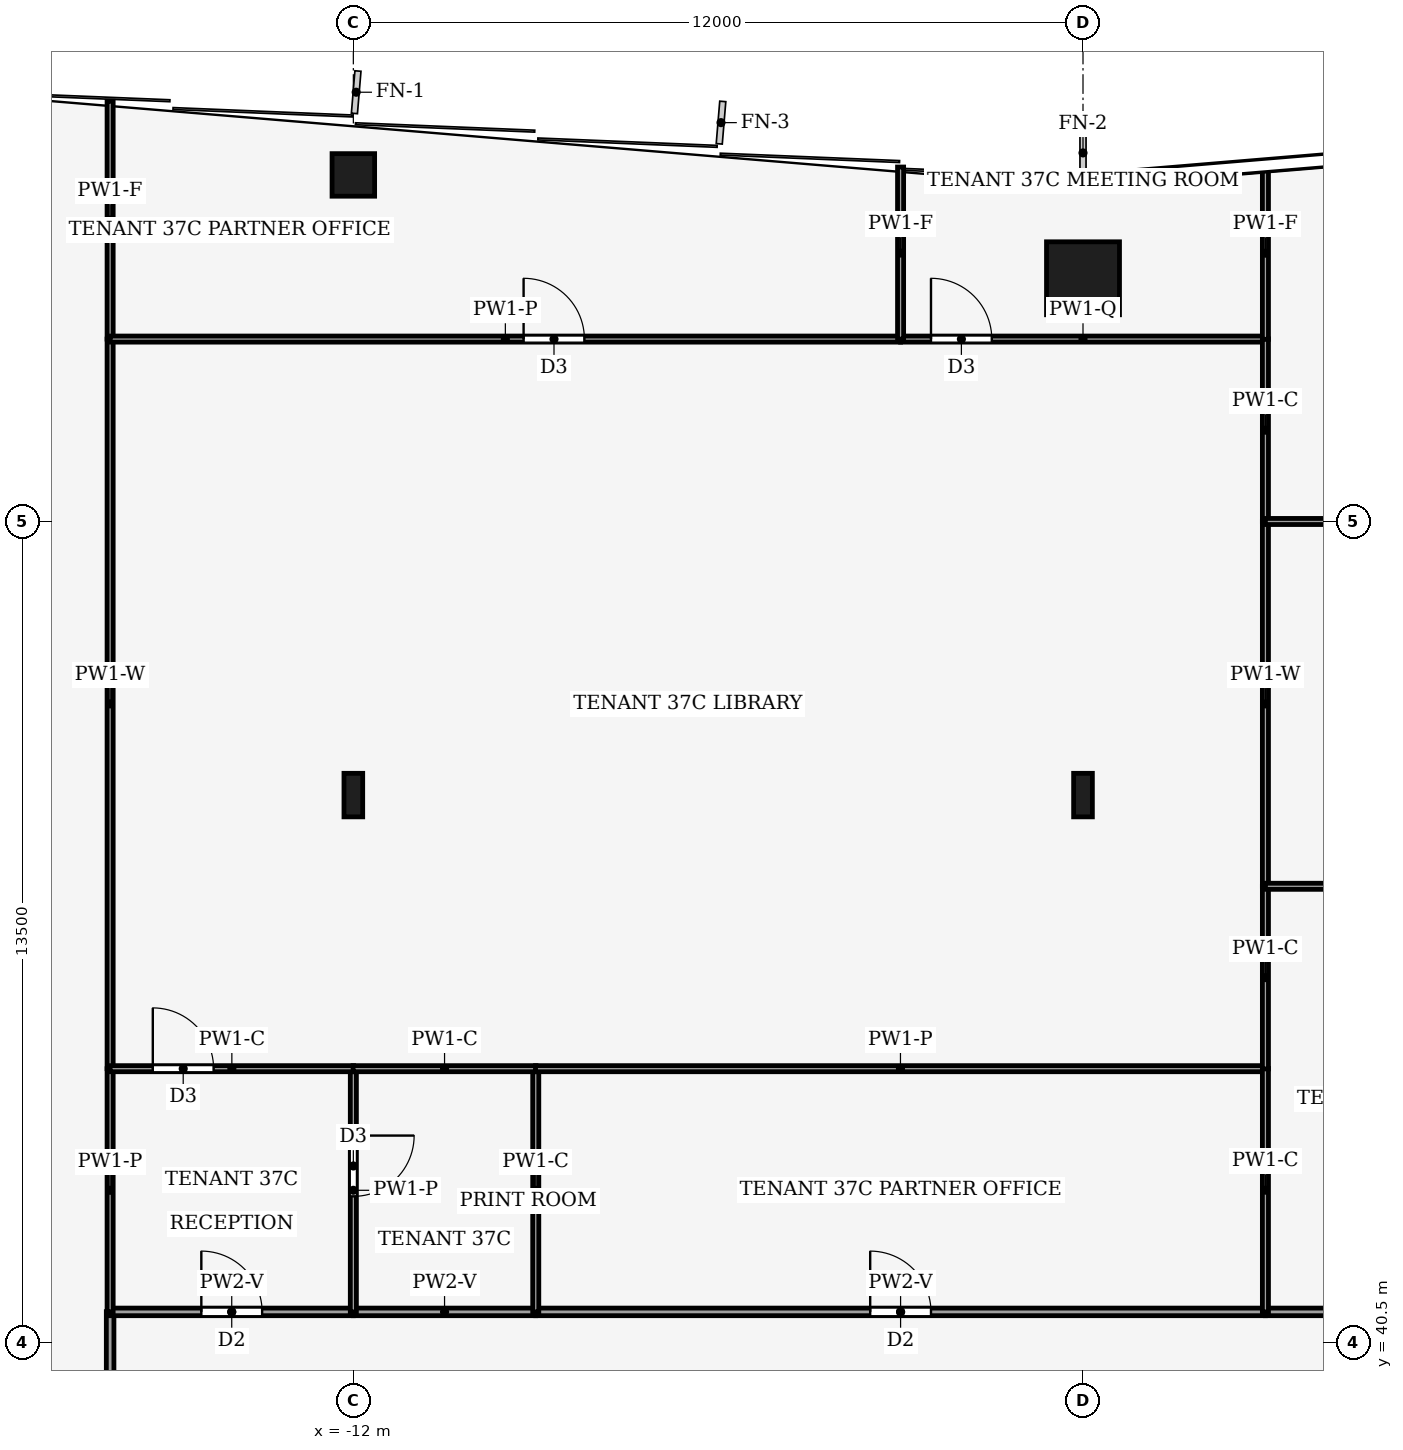
"""IFC4 building model, lengths in metres.
Left out: names, types, materials, properties, quantities, classifications, styles, units other than length and angle.
Written with IfcOpenShell. Run it as: python <this file> out.ifc"""

import sys

from ifc_helpers import new_model, si_unit, direction, frame, frame_2d, origin, origin_2d, place, context, subcontext, project, spatial, rectangle, hollow_rectangle, i_section, extrude, element, fill, save


model = new_model("IFC4")
c1 = context("Model", 3, precision=1e-05, world=origin(), true_north=direction((0.0, 1.0)))
c2 = subcontext(c1, "Body", "Model", "MODEL_VIEW")
j1 = project(units=[si_unit("LENGTHUNIT", "METRE"), si_unit("PLANEANGLEUNIT", "RADIAN")], contexts=[c1])
p1 = place(None, origin())
s1 = spatial("IfcSite", under=j1, at=p1, CompositionType="ELEMENT")
p2 = place(p1, origin())
s2 = spatial("IfcBuilding", under=s1, at=p2, CompositionType="ELEMENT")
p3 = place(p2, frame((0.0, 0.0, 162.0)))
s3 = spatial("IfcBuildingStorey", under=s2, at=p3, CompositionType="ELEMENT", Elevation=162.0)
p4 = place(p3, frame((0.0, 58.0, 0.0), z_axis=(0.0, 0.0, 1.0), x_axis=(1.0, 0.0, 0.0)))
e1 = element("IfcColumn", 1, at=p4, inside=s3, PredefinedType="COLUMN", context=c2, shape_type="SweptSolid", body=[
    extrude(hollow_rectangle(XDim=1.2, YDim=1.2, WallThickness=0.07, at=origin_2d()), origin(), (0.0, 0.0, 1.0), 4.0),
])
p5 = place(p3, frame((-12.0, 59.7, 0.0), z_axis=(0.0, 0.0, 1.0), x_axis=(1.0, 0.0, 0.0)))
e2 = element("IfcColumn", 2, at=p5, inside=s3, PredefinedType="COLUMN", context=c2, shape_type="SweptSolid", body=[
    extrude(hollow_rectangle(XDim=0.7, YDim=0.7, WallThickness=0.03, at=origin_2d()), origin(), (0.0, 0.0, 1.0), 4.0),
])
for number, where, z_axis, x_axis in (
    (3, (-12.0, 49.5, 0.0), (0.0, 0.0, 1.0), (1.0, 0.0, 0.0)),
    (4, (0.0, 49.5, 0.0), (0.0, 0.0, 1.0), (1.0, 0.0, 0.0)),
):
    element("IfcColumn", number, at=place(p3, frame(where, z_axis=z_axis, x_axis=x_axis)), inside=s3, PredefinedType="COLUMN", context=c2, shape_type="SweptSolid", body=[
        extrude(i_section(OverallWidth=0.308, OverallDepth=0.716, WebThickness=0.021, FlangeThickness=0.04, FilletRadius=0.027, at=origin_2d()), origin(), (0.0, 0.0, 1.0), 4.0),
    ])
p6 = place(p3, frame((-16.0, 36.0, 0.0), z_axis=(0.0, 0.0, 1.0), x_axis=(0.0, 1.0, 0.0)))
e5 = element("IfcWall", 5, at=p6, inside=s3, PredefinedType="PARTITIONING", context=c2, shape_type="SweptSolid", body=[
    extrude(rectangle(XDim=5.004, YDim=0.125, at=frame_2d((2.502, 0.0))), origin(), (0.0, 0.0, 1.0), 3.14),
])
p7 = place(p6, frame((2.002, 0.0, 0.0)))
e6 = element("IfcOpeningElement", 6, at=p7, cuts=e5, PredefinedType="OPENING", context=c2, shape_type="SweptSolid", body=[
    extrude(rectangle(XDim=1.0, YDim=2.1, at=frame_2d((0.5, 1.05))), frame((0.0, 0.073, 0.0), z_axis=(0.0, -1.0, 0.0), x_axis=(1.0, 0.0, 0.0)), (0.0, 0.0, 1.0), 0.145),
])
p8 = place(p3, frame((-16.0, 41.0, 0.0), z_axis=(0.0, 0.0, 1.0), x_axis=(1.0, 0.0, 0.0)))
e7 = element("IfcWall", 7, at=p8, inside=s3, PredefinedType="PARTITIONING", context=c2, shape_type="SweptSolid", body=[
    extrude(rectangle(XDim=4.0, YDim=0.125, at=frame_2d((2.0, 0.0))), origin(), (0.0, 0.0, 1.0), 3.44),
])
p9 = place(p8, frame((1.5, 0.0, 0.0)))
e8 = element("IfcOpeningElement", 8, at=p9, cuts=e7, PredefinedType="OPENING", context=c2, shape_type="SweptSolid", body=[
    extrude(rectangle(XDim=1.0, YDim=2.1, at=frame_2d((0.5, 1.05))), frame((0.0, 0.073, 0.0), z_axis=(0.0, -1.0, 0.0), x_axis=(1.0, 0.0, 0.0)), (0.0, 0.0, 1.0), 0.145),
])
p10 = place(p3, frame((-9.0, 41.0, 0.0), z_axis=(0.0, 0.0, 1.0), x_axis=(-1.0, 0.0, 0.0)))
e9 = element("IfcWall", 9, at=p10, inside=s3, PredefinedType="PARTITIONING", context=c2, shape_type="SweptSolid", body=[
    extrude(rectangle(XDim=3.0, YDim=0.125, at=frame_2d((1.5, 0.0))), origin(), (0.0, 0.0, 1.0), 3.44),
])
p11 = place(p3, frame((-9.0, 41.0, 0.0), z_axis=(0.0, 0.0, 1.0), x_axis=(1.0, 0.0, 0.0)))
e10 = element("IfcWall", 10, at=p11, inside=s3, PredefinedType="PARTITIONING", context=c2, shape_type="SweptSolid", body=[
    extrude(rectangle(XDim=12.0, YDim=0.125, at=frame_2d((6.0, 0.0))), origin(), (0.0, 0.0, 1.0), 3.44),
])
p12 = place(p11, frame((5.5, 0.0, 0.0)))
e11 = element("IfcOpeningElement", 11, at=p12, cuts=e10, PredefinedType="OPENING", context=c2, shape_type="SweptSolid", body=[
    extrude(rectangle(XDim=1.0, YDim=2.1, at=frame_2d((0.5, 1.05))), frame((0.0, 0.073, 0.0), z_axis=(0.0, -1.0, 0.0), x_axis=(1.0, 0.0, 0.0)), (0.0, 0.0, 1.0), 0.145),
])
p13 = place(p3, frame((3.0, 41.0, 0.0), z_axis=(0.0, 0.0, 1.0), x_axis=(1.0, 0.0, 0.0)))
e12 = element("IfcWall", 12, at=p13, inside=s3, PredefinedType="PARTITIONING", context=c2, shape_type="SweptSolid", body=[
    extrude(rectangle(XDim=6.0, YDim=0.125, at=frame_2d((3.0, 0.0))), origin(), (0.0, 0.0, 1.0), 3.44),
])
p14 = place(p13, frame((2.5, 0.0, 0.0)))
e13 = element("IfcOpeningElement", 13, at=p14, cuts=e12, PredefinedType="OPENING", context=c2, shape_type="SweptSolid", body=[
    extrude(rectangle(XDim=1.0, YDim=2.1, at=frame_2d((0.5, 1.05))), frame((0.0, 0.073, 0.0), z_axis=(0.0, -1.0, 0.0), x_axis=(1.0, 0.0, 0.0)), (0.0, 0.0, 1.0), 0.145),
])
p15 = place(p3, frame((-16.0, 41.0, 0.0), z_axis=(0.0, 0.0, 1.0), x_axis=(0.0, 1.0, 0.0)))
e14 = element("IfcWall", 14, at=p15, inside=s3, PredefinedType="PARTITIONING", context=c2, shape_type="SweptSolid", body=[
    extrude(rectangle(XDim=4.0, YDim=0.1, at=frame_2d((2.0, 0.0))), origin(), (0.0, 0.0, 1.0), 3.44),
])
p16 = place(p3, frame((-16.0, 45.0, 0.0), z_axis=(0.0, 0.0, 1.0), x_axis=(0.0, 1.0, 0.0)))
e15 = element("IfcWall", 15, at=p16, inside=s3, PredefinedType="PARTITIONING", context=c2, shape_type="SweptSolid", body=[
    extrude(rectangle(XDim=12.0, YDim=0.1, at=frame_2d((6.0, 0.0))), origin(), (0.0, 0.0, 1.0), 3.24),
])
p17 = place(p3, frame((-16.0, 57.0, 0.0), z_axis=(0.0, 0.0, 1.0), x_axis=(0.0, 1.0, 0.0)))
e16 = element("IfcWall", 16, at=p17, inside=s3, PredefinedType="PARTITIONING", context=c2, shape_type="SweptSolid", body=[
    extrude(rectangle(XDim=3.913, YDim=0.1, at=frame_2d((1.957, 0.0))), origin(), (0.0, 0.0, 1.0), 3.04),
])
p18 = place(p3, frame((-12.0, 45.0, 0.0), z_axis=(0.0, 0.0, 1.0), x_axis=(0.0, -1.0, 0.0)))
e17 = element("IfcWall", 17, at=p18, inside=s3, PredefinedType="PARTITIONING", context=c2, shape_type="SweptSolid", body=[
    extrude(rectangle(XDim=4.0, YDim=0.1, at=frame_2d((2.0, 0.0))), origin(), (0.0, 0.0, 1.0), 3.44),
])
p19 = place(p18, frame((1.1, 0.0, 0.0)))
e18 = element("IfcOpeningElement", 18, at=p19, cuts=e17, PredefinedType="OPENING", context=c2, shape_type="SweptSolid", body=[
    extrude(rectangle(XDim=1.0, YDim=2.1, at=frame_2d((0.5, 1.05))), frame((0.0, 0.06, 0.0), z_axis=(0.0, -1.0, 0.0), x_axis=(1.0, 0.0, 0.0)), (0.0, 0.0, 1.0), 0.12),
])
p20 = place(p3, frame((-16.0, 45.0, 0.0), z_axis=(0.0, 0.0, 1.0), x_axis=(1.0, 0.0, 0.0)))
e19 = element("IfcWall", 19, at=p20, inside=s3, PredefinedType="PARTITIONING", context=c2, shape_type="SweptSolid", body=[
    extrude(rectangle(XDim=4.004, YDim=0.1, at=frame_2d((2.002, 0.0))), origin(), (0.0, 0.0, 1.0), 3.87),
])
p21 = place(p20, frame((0.702, 0.0, 0.0)))
e20 = element("IfcOpeningElement", 20, at=p21, cuts=e19, PredefinedType="OPENING", context=c2, shape_type="SweptSolid", body=[
    extrude(rectangle(XDim=1.0, YDim=2.1, at=frame_2d((0.5, 1.05))), frame((0.0, 0.06, 0.0), z_axis=(0.0, -1.0, 0.0), x_axis=(1.0, 0.0, 0.0)), (0.0, 0.0, 1.0), 0.12),
])
p22 = place(p3, frame((-9.0, 41.0, 0.0), z_axis=(0.0, 0.0, 1.0), x_axis=(0.0, 1.0, 0.0)))
e21 = element("IfcWall", 21, at=p22, inside=s3, PredefinedType="PARTITIONING", context=c2, shape_type="SweptSolid", body=[
    extrude(rectangle(XDim=4.0, YDim=0.1, at=frame_2d((2.0, 0.0))), origin(), (0.0, 0.0, 1.0), 3.87),
])
p23 = place(p3, frame((-8.996, 45.0, 0.0), z_axis=(0.0, 0.0, 1.0), x_axis=(-1.0, 0.0, 0.0)))
e22 = element("IfcWall", 22, at=p23, inside=s3, PredefinedType="PARTITIONING", context=c2, shape_type="SweptSolid", body=[
    extrude(rectangle(XDim=3.008, YDim=0.1, at=frame_2d((1.504, 0.0))), origin(), (0.0, 0.0, 1.0), 3.87),
])
p24 = place(p3, frame((3.0, 45.0, 0.0), z_axis=(0.0, 0.0, 1.0), x_axis=(-1.0, 0.0, 0.0)))
e23 = element("IfcWall", 23, at=p24, inside=s3, PredefinedType="PARTITIONING", context=c2, shape_type="SweptSolid", body=[
    extrude(rectangle(XDim=12.004, YDim=0.1, at=frame_2d((6.002, 0.0))), origin(), (0.0, 0.0, 1.0), 3.44),
])
p25 = place(p3, frame((3.0, 41.0, 0.0), z_axis=(0.0, 0.0, 1.0), x_axis=(0.0, 1.0, 0.0)))
e24 = element("IfcWall", 24, at=p25, inside=s3, PredefinedType="PARTITIONING", context=c2, shape_type="SweptSolid", body=[
    extrude(rectangle(XDim=4.004, YDim=0.1, at=frame_2d((2.002, 0.0))), origin(), (0.0, 0.0, 1.0), 3.87),
])
p26 = place(p3, frame((-16.0, 57.0, 0.0), z_axis=(0.0, 0.0, 1.0), x_axis=(1.0, 0.0, 0.0)))
e25 = element("IfcWall", 25, at=p26, inside=s3, PredefinedType="PARTITIONING", context=c2, shape_type="SweptSolid", body=[
    extrude(rectangle(XDim=13.0, YDim=0.1, at=frame_2d((6.5, 0.0))), origin(), (0.0, 0.0, 1.0), 3.44),
])
p27 = place(p26, frame((6.8, 0.0, 0.0)))
e26 = element("IfcOpeningElement", 26, at=p27, cuts=e25, PredefinedType="OPENING", context=c2, shape_type="SweptSolid", body=[
    extrude(rectangle(XDim=1.0, YDim=2.1, at=frame_2d((0.5, 1.05))), frame((0.0, 0.06, 0.0), z_axis=(0.0, -1.0, 0.0), x_axis=(1.0, 0.0, 0.0)), (0.0, 0.0, 1.0), 0.12),
])
p28 = place(p3, frame((-3.0, 57.0, 0.0), z_axis=(0.0, 0.0, 1.0), x_axis=(1.0, 0.0, 0.0)))
e27 = element("IfcWall", 27, at=p28, inside=s3, PredefinedType="PARTITIONING", context=c2, shape_type="SweptSolid", body=[
    extrude(rectangle(XDim=6.0, YDim=0.1, at=frame_2d((3.0, 0.0))), origin(), (0.0, 0.0, 1.0), 3.48),
])
p29 = place(p28, frame((0.5, 0.0, 0.0)))
e28 = element("IfcOpeningElement", 28, at=p29, cuts=e27, PredefinedType="OPENING", context=c2, shape_type="SweptSolid", body=[
    extrude(rectangle(XDim=1.0, YDim=2.1, at=frame_2d((0.5, 1.05))), frame((0.0, 0.06, 0.0), z_axis=(0.0, -1.0, 0.0), x_axis=(1.0, 0.0, 0.0)), (0.0, 0.0, 1.0), 0.12),
])
p30 = place(p3, frame((3.0, 44.996, 0.0), z_axis=(0.0, 0.0, 1.0), x_axis=(0.0, 1.0, 0.0)))
e29 = element("IfcWall", 29, at=p30, inside=s3, PredefinedType="PARTITIONING", context=c2, shape_type="SweptSolid", body=[
    extrude(rectangle(XDim=3.004, YDim=0.1, at=frame_2d((1.502, 0.0))), origin(), (0.0, 0.0, 1.0), 3.87),
])
p31 = place(p3, frame((3.0, 48.0, 0.0), z_axis=(0.0, 0.0, 1.0), x_axis=(0.0, 1.0, 0.0)))
e30 = element("IfcWall", 30, at=p31, inside=s3, PredefinedType="PARTITIONING", context=c2, shape_type="SweptSolid", body=[
    extrude(rectangle(XDim=6.0, YDim=0.1, at=frame_2d((3.0, 0.0))), origin(), (0.0, 0.0, 1.0), 3.24),
])
p32 = place(p3, frame((3.0, 54.0, 0.0), z_axis=(0.0, 0.0, 1.0), x_axis=(0.0, 1.0, 0.0)))
e31 = element("IfcWall", 31, at=p32, inside=s3, PredefinedType="PARTITIONING", context=c2, shape_type="SweptSolid", body=[
    extrude(rectangle(XDim=3.004, YDim=0.1, at=frame_2d((1.502, 0.0))), origin(), (0.0, 0.0, 1.0), 3.87),
])
p33 = place(p3, frame((-3.0, 57.0, 0.0), z_axis=(0.0, 0.0, 1.0), x_axis=(0.0, 1.0, 0.0)))
e32 = element("IfcWall", 32, at=p33, inside=s3, PredefinedType="PARTITIONING", context=c2, shape_type="SweptSolid", body=[
    extrude(rectangle(XDim=2.83, YDim=0.1, at=frame_2d((1.415, 0.0))), origin(), (0.0, 0.0, 1.0), 3.04),
])
p34 = place(p3, frame((3.0, 56.996, 0.0), z_axis=(0.0, 0.0, 1.0), x_axis=(0.0, 1.0, 0.0)))
e33 = element("IfcWall", 33, at=p34, inside=s3, PredefinedType="PARTITIONING", context=c2, shape_type="SweptSolid", body=[
    extrude(rectangle(XDim=2.834, YDim=0.1, at=frame_2d((1.417, 0.0))), origin(), (0.0, 0.0, 1.0), 3.04),
])
p35 = place(p3, frame((3.0, 48.0, 0.0), z_axis=(0.0, 0.0, 1.0), x_axis=(1.0, 0.0, 0.0)))
e34 = element("IfcWall", 34, at=p35, inside=s3, PredefinedType="PARTITIONING", context=c2, shape_type="SweptSolid", body=[
    extrude(rectangle(XDim=6.004, YDim=0.1, at=frame_2d((3.002, 0.0))), origin(), (0.0, 0.0, 1.0), 3.44),
])
p36 = place(p35, frame((2.502, 0.0, 0.0)))
e35 = element("IfcOpeningElement", 35, at=p36, cuts=e34, PredefinedType="OPENING", context=c2, shape_type="SweptSolid", body=[
    extrude(rectangle(XDim=1.0, YDim=2.1, at=frame_2d((0.5, 1.05))), frame((0.0, 0.06, 0.0), z_axis=(0.0, -1.0, 0.0), x_axis=(1.0, 0.0, 0.0)), (0.0, 0.0, 1.0), 0.12),
])
p37 = place(p3, frame((3.0, 54.0, 0.0), z_axis=(0.0, 0.0, 1.0), x_axis=(1.0, 0.0, 0.0)))
e36 = element("IfcWall", 36, at=p37, inside=s3, PredefinedType="PARTITIONING", context=c2, shape_type="SweptSolid", body=[
    extrude(rectangle(XDim=9.0, YDim=0.1, at=frame_2d((4.5, 0.0))), origin(), (0.0, 0.0, 1.0), 3.44),
])
p38 = place(p37, frame((4.0, 0.0, 0.0)))
e37 = element("IfcOpeningElement", 37, at=p38, cuts=e36, PredefinedType="OPENING", context=c2, shape_type="SweptSolid", body=[
    extrude(rectangle(XDim=1.0, YDim=2.1, at=frame_2d((0.5, 1.05))), frame((0.0, 0.06, 0.0), z_axis=(0.0, -1.0, 0.0), x_axis=(1.0, 0.0, 0.0)), (0.0, 0.0, 1.0), 0.12),
])
p39 = place(p9, origin())
e38 = element("IfcDoor", 38, at=p39, inside=s3, OperationType="SINGLE_SWING_LEFT", PredefinedType="DOOR", context=c2, shape_type="SweptSolid", body=[
    extrude(rectangle(XDim=1.0, YDim=2.1, at=frame_2d((0.5, 1.05))), frame((0.0, 0.025, 0.0), z_axis=(0.0, -1.0, 0.0), x_axis=(1.0, 0.0, 0.0)), (0.0, 0.0, 1.0), 0.05),
])
fill(e8, e38)
p40 = place(p12, origin())
e39 = element("IfcDoor", 39, at=p40, inside=s3, OperationType="SINGLE_SWING_RIGHT", PredefinedType="DOOR", context=c2, shape_type="SweptSolid", body=[
    extrude(rectangle(XDim=1.0, YDim=2.1, at=frame_2d((0.5, 1.05))), frame((0.0, 0.025, 0.0), z_axis=(0.0, -1.0, 0.0), x_axis=(1.0, 0.0, 0.0)), (0.0, 0.0, 1.0), 0.05),
])
fill(e11, e39)
p41 = place(p19, origin())
e40 = element("IfcDoor", 40, at=p41, inside=s3, OperationType="SINGLE_SWING_LEFT", PredefinedType="DOOR", context=c2, shape_type="SweptSolid", body=[
    extrude(rectangle(XDim=1.0, YDim=2.1, at=frame_2d((0.5, 1.05))), frame((0.0, 0.025, 0.0), z_axis=(0.0, -1.0, 0.0), x_axis=(1.0, 0.0, 0.0)), (0.0, 0.0, 1.0), 0.05),
])
fill(e18, e40)
p42 = place(p21, origin())
e41 = element("IfcDoor", 41, at=p42, inside=s3, OperationType="SINGLE_SWING_LEFT", PredefinedType="DOOR", context=c2, shape_type="SweptSolid", body=[
    extrude(rectangle(XDim=1.0, YDim=2.1, at=frame_2d((0.5, 1.05))), frame((0.0, 0.025, 0.0), z_axis=(0.0, -1.0, 0.0), x_axis=(1.0, 0.0, 0.0)), (0.0, 0.0, 1.0), 0.05),
])
fill(e20, e41)
p43 = place(p27, origin())
e42 = element("IfcDoor", 42, at=p43, inside=s3, OperationType="SINGLE_SWING_RIGHT", PredefinedType="DOOR", context=c2, shape_type="SweptSolid", body=[
    extrude(rectangle(XDim=1.0, YDim=2.1, at=frame_2d((0.5, 1.05))), frame((0.0, 0.025, 0.0), z_axis=(0.0, -1.0, 0.0), x_axis=(1.0, 0.0, 0.0)), (0.0, 0.0, 1.0), 0.05),
])
fill(e26, e42)
p44 = place(p29, origin())
e43 = element("IfcDoor", 43, at=p44, inside=s3, OperationType="SINGLE_SWING_LEFT", PredefinedType="DOOR", context=c2, shape_type="SweptSolid", body=[
    extrude(rectangle(XDim=1.0, YDim=2.1, at=frame_2d((0.5, 1.05))), frame((0.0, 0.025, 0.0), z_axis=(0.0, -1.0, 0.0), x_axis=(1.0, 0.0, 0.0)), (0.0, 0.0, 1.0), 0.05),
])
fill(e28, e43)
save(model, sys.argv[1])
